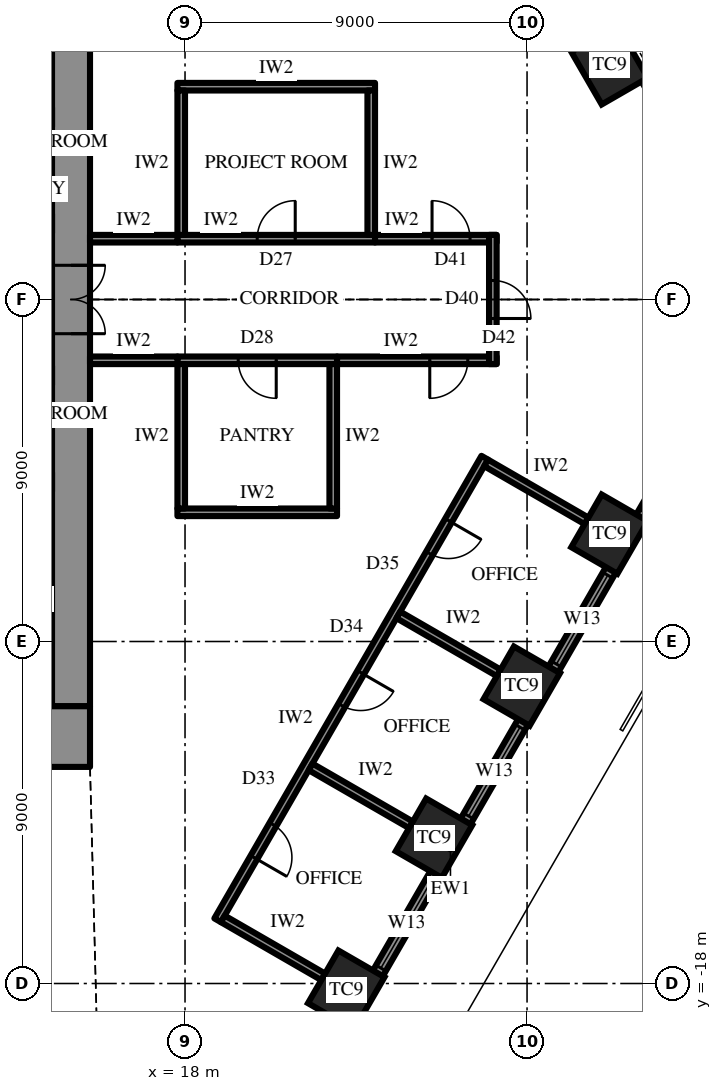
"""IFC4 building model, lengths in metres.
Left out: names, types, materials, properties, quantities, classifications, styles, units other than length and angle.
Written with IfcOpenShell. Run it as: python <this file> out.ifc"""

import sys

from ifc_helpers import new_model, si_unit, direction, frame, frame_2d, origin, origin_2d, place, context, subcontext, project, spatial, rectangle, extrude, element, fill, save


model = new_model("IFC4")
c1 = context("Model", 3, precision=1e-05, world=origin(), true_north=direction((0.0, 1.0)))
c2 = subcontext(c1, "Body", "Model", "MODEL_VIEW")
j1 = project(units=[si_unit("LENGTHUNIT", "METRE"), si_unit("PLANEANGLEUNIT", "RADIAN")], contexts=[c1])
p1 = place(None, origin())
s1 = spatial("IfcSite", under=j1, at=p1, CompositionType="ELEMENT")
p2 = place(p1, origin())
s2 = spatial("IfcBuilding", under=s1, at=p2, CompositionType="ELEMENT")
p3 = place(p2, frame((0.0, 0.0, 219.7)))
s3 = spatial("IfcBuildingStorey", under=s2, at=p3, CompositionType="ELEMENT", Elevation=219.7)
for number, where, z_axis, x_axis in (
    (1, (29.171, 6.175, 0.0), (0.0, 0.0, 1.0), (-0.5, 0.866, 0.0)),
    (2, (22.242, -18.175, 0.0), (0.0, 0.0, 1.0), (0.5, 0.866, 0.0)),
    (3, (24.552, -14.175, 0.0), (0.0, 0.0, 1.0), (0.5, 0.866, 0.0)),
    (4, (26.861, -10.175, 0.0), (0.0, 0.0, 1.0), (0.5, 0.866, 0.0)),
    (5, (29.171, -6.175, 0.0), (0.0, 0.0, 1.0), (0.5, 0.866, 0.0)),
):
    element("IfcColumn", number, at=place(p3, frame(where, z_axis=z_axis, x_axis=x_axis)), inside=s3, PredefinedType="COLUMN", context=c2, shape_type="SweptSolid", body=[
        extrude(rectangle(XDim=1.6, YDim=1.4, at=origin_2d()), origin(), (0.0, 0.0, 1.0), 4.2),
    ])
p4 = place(p3, frame((15.5, -11.5, 0.0), z_axis=(0.0, 0.0, 1.0), x_axis=(-1.0, 0.0, 0.0)))
e6 = element("IfcWall", 6, at=p4, inside=s3, PredefinedType="SHEAR", context=c2, shape_type="SweptSolid", body=[
    extrude(rectangle(XDim=31.0, YDim=1.6, at=frame_2d((15.5, 0.0))), origin(), (0.0, 0.0, 1.0), 4.2),
])
p5 = place(p4, frame((16.35, 0.0, 0.0)))
e7 = element("IfcOpeningElement", 7, at=p5, cuts=e6, PredefinedType="OPENING", context=c2, shape_type="SweptSolid", body=[
    extrude(rectangle(XDim=0.9, YDim=2.2, at=frame_2d((0.45, 1.1))), frame((0.0, 0.81, 0.0), z_axis=(0.0, -1.0, 0.0), x_axis=(1.0, 0.0, 0.0)), (0.0, 0.0, 1.0), 1.62),
])
p6 = place(p4, frame((19.35, 0.0, 0.0)))
e8 = element("IfcOpeningElement", 8, at=p6, cuts=e6, PredefinedType="OPENING", context=c2, shape_type="SweptSolid", body=[
    extrude(rectangle(XDim=0.9, YDim=2.2, at=frame_2d((0.45, 1.1))), frame((0.0, 0.81, 0.0), z_axis=(0.0, -1.0, 0.0), x_axis=(1.0, 0.0, 0.0)), (0.0, 0.0, 1.0), 1.62),
])
p7 = place(p4, frame((22.4, 0.0, 0.0)))
e9 = element("IfcOpeningElement", 9, at=p7, cuts=e6, PredefinedType="OPENING", context=c2, shape_type="SweptSolid", body=[
    extrude(rectangle(XDim=1.0, YDim=2.2, at=frame_2d((0.5, 1.1))), frame((0.0, 0.81, 0.0), z_axis=(0.0, -1.0, 0.0), x_axis=(1.0, 0.0, 0.0)), (0.0, 0.0, 1.0), 1.62),
])
p8 = place(p4, frame((1.65, 0.0, 0.0)))
e10 = element("IfcOpeningElement", 10, at=p8, cuts=e6, PredefinedType="OPENING", context=c2, shape_type="SweptSolid", body=[
    extrude(rectangle(XDim=0.9, YDim=2.2, at=frame_2d((0.45, 1.1))), frame((0.0, 0.81, 0.0), z_axis=(0.0, -1.0, 0.0), x_axis=(1.0, 0.0, 0.0)), (0.0, 0.0, 1.0), 1.62),
])
p9 = place(p4, frame((4.65, 0.0, 0.0)))
e11 = element("IfcOpeningElement", 11, at=p9, cuts=e6, PredefinedType="OPENING", context=c2, shape_type="SweptSolid", body=[
    extrude(rectangle(XDim=0.9, YDim=2.2, at=frame_2d((0.45, 1.1))), frame((0.0, 0.81, 0.0), z_axis=(0.0, -1.0, 0.0), x_axis=(1.0, 0.0, 0.0)), (0.0, 0.0, 1.0), 1.62),
])
p10 = place(p4, frame((25.45, 0.0, 0.0)))
e12 = element("IfcOpeningElement", 12, at=p10, cuts=e6, PredefinedType="OPENING", context=c2, shape_type="SweptSolid", body=[
    extrude(rectangle(XDim=0.9, YDim=2.2, at=frame_2d((0.45, 1.1))), frame((0.0, 0.81, 0.0), z_axis=(0.0, -1.0, 0.0), x_axis=(1.0, 0.0, 0.0)), (0.0, 0.0, 1.0), 1.62),
])
p11 = place(p4, frame((28.45, 0.0, 0.0)))
e13 = element("IfcOpeningElement", 13, at=p11, cuts=e6, PredefinedType="OPENING", context=c2, shape_type="SweptSolid", body=[
    extrude(rectangle(XDim=0.9, YDim=2.2, at=frame_2d((0.45, 1.1))), frame((0.0, 0.81, 0.0), z_axis=(0.0, -1.0, 0.0), x_axis=(1.0, 0.0, 0.0)), (0.0, 0.0, 1.0), 1.62),
])
p12 = place(p3, frame((15.0, -10.7, 0.0), z_axis=(0.0, 0.0, 1.0), x_axis=(0.0, 1.0, 0.0)))
e14 = element("IfcWall", 14, at=p12, inside=s3, PredefinedType="SHEAR", context=c2, shape_type="SweptSolid", body=[
    extrude(rectangle(XDim=21.4, YDim=1.0, at=frame_2d((10.7, 0.0))), origin(), (0.0, 0.0, 1.0), 4.2),
])
p13 = place(p12, frame((9.8, 0.0, 0.0)))
e15 = element("IfcOpeningElement", 15, at=p13, cuts=e14, PredefinedType="OPENING", context=c2, shape_type="SweptSolid", body=[
    extrude(rectangle(XDim=1.8, YDim=2.4, at=frame_2d((0.9, 1.2))), frame((0.0, 0.51, 0.0), z_axis=(0.0, -1.0, 0.0), x_axis=(1.0, 0.0, 0.0)), (0.0, 0.0, 1.0), 1.02),
])
p14 = place(p3, frame((12.3, 2.0, 0.0), z_axis=(0.0, 0.0, 1.0), x_axis=(1.0, 0.0, 0.0)))
e16 = element("IfcWall", 16, at=p14, inside=s3, PredefinedType="SHEAR", context=c2, shape_type="SweptSolid", body=[
    extrude(rectangle(XDim=2.2, YDim=0.5, at=frame_2d((1.1, 0.0))), origin(), (0.0, 0.0, 1.0), 4.2),
])
p15 = place(p14, frame((0.8, 0.0, 0.0)))
e17 = element("IfcOpeningElement", 17, at=p15, cuts=e16, PredefinedType="OPENING", context=c2, shape_type="SweptSolid", body=[
    extrude(rectangle(XDim=0.9, YDim=2.2, at=frame_2d((0.45, 1.1))), frame((0.0, 0.26, 0.0), z_axis=(0.0, -1.0, 0.0), x_axis=(1.0, 0.0, 0.0)), (0.0, 0.0, 1.0), 0.52),
])
p16 = place(p3, frame((12.3, 4.8, 0.0), z_axis=(0.0, 0.0, 1.0), x_axis=(1.0, 0.0, 0.0)))
e18 = element("IfcWall", 18, at=p16, inside=s3, PredefinedType="SHEAR", context=c2, shape_type="SweptSolid", body=[
    extrude(rectangle(XDim=2.2, YDim=0.5, at=frame_2d((1.1, 0.0))), origin(), (0.0, 0.0, 1.0), 4.2),
])
p17 = place(p3, frame((18.057, -26.425, 0.0), z_axis=(0.0, 0.0, 1.0), x_axis=(0.500001051461, 0.866024796723, 0.0)))
e19 = element("IfcWall", 19, at=p17, inside=s3, PredefinedType="SOLIDWALL", context=c2, shape_type="SweptSolid", body=[
    extrude(rectangle(XDim=27.713, YDim=0.3, at=frame_2d((13.856, 0.0))), origin(), (0.0, 0.0, 1.0), 2.0),
])
p18 = place(p17, frame((0.959, 0.0, 0.6)))
e20 = element("IfcOpeningElement", 20, at=p18, cuts=e19, PredefinedType="OPENING", context=c2, shape_type="SweptSolid", body=[
    extrude(rectangle(XDim=2.7, YDim=1.15, at=frame_2d((1.35, 0.575))), frame((0.0, 0.16, 0.0), z_axis=(0.0, -1.0, 0.0), x_axis=(1.0, 0.0, 0.0)), (0.0, 0.0, 1.0), 0.32),
])
p19 = place(p17, frame((5.578, 0.0, 0.6)))
e21 = element("IfcOpeningElement", 21, at=p19, cuts=e19, PredefinedType="OPENING", context=c2, shape_type="SweptSolid", body=[
    extrude(rectangle(XDim=2.7, YDim=1.15, at=frame_2d((1.35, 0.575))), frame((0.0, 0.16, 0.0), z_axis=(0.0, -1.0, 0.0), x_axis=(1.0, 0.0, 0.0)), (0.0, 0.0, 1.0), 0.32),
])
p20 = place(p17, frame((10.197, 0.0, 0.6)))
e22 = element("IfcOpeningElement", 22, at=p20, cuts=e19, PredefinedType="OPENING", context=c2, shape_type="SweptSolid", body=[
    extrude(rectangle(XDim=2.7, YDim=1.15, at=frame_2d((1.35, 0.575))), frame((0.0, 0.16, 0.0), z_axis=(0.0, -1.0, 0.0), x_axis=(1.0, 0.0, 0.0)), (0.0, 0.0, 1.0), 0.32),
])
p21 = place(p17, frame((14.816, 0.0, 0.6)))
e23 = element("IfcOpeningElement", 23, at=p21, cuts=e19, PredefinedType="OPENING", context=c2, shape_type="SweptSolid", body=[
    extrude(rectangle(XDim=2.7, YDim=1.15, at=frame_2d((1.35, 0.575))), frame((0.0, 0.16, 0.0), z_axis=(0.0, -1.0, 0.0), x_axis=(1.0, 0.0, 0.0)), (0.0, 0.0, 1.0), 0.32),
])
p22 = place(p17, frame((19.435, 0.0, 0.6)))
e24 = element("IfcOpeningElement", 24, at=p22, cuts=e19, PredefinedType="OPENING", context=c2, shape_type="SweptSolid", body=[
    extrude(rectangle(XDim=2.7, YDim=1.15, at=frame_2d((1.35, 0.575))), frame((0.0, 0.16, 0.0), z_axis=(0.0, -1.0, 0.0), x_axis=(1.0, 0.0, 0.0)), (0.0, 0.0, 1.0), 0.32),
])
p23 = place(p17, frame((24.053, 0.0, 0.6)))
e25 = element("IfcOpeningElement", 25, at=p23, cuts=e19, PredefinedType="OPENING", context=c2, shape_type="SweptSolid", body=[
    extrude(rectangle(XDim=2.7, YDim=1.15, at=frame_2d((1.35, 0.575))), frame((0.0, 0.16, 0.0), z_axis=(0.0, -1.0, 0.0), x_axis=(1.0, 0.0, 0.0)), (0.0, 0.0, 1.0), 0.32),
])
p24 = place(p3, frame((18.858, -16.337, 0.0), z_axis=(0.0, 0.0, 1.0), x_axis=(0.500002095642, 0.866024193862, 0.0)))
e26 = element("IfcWall", 26, at=p24, inside=s3, PredefinedType="PARTITIONING", context=c2, shape_type="SweptSolid", body=[
    extrude(rectangle(XDim=14.057, YDim=0.2, at=frame_2d((7.028, 0.0))), origin(), (0.0, 0.0, 1.0), 4.0),
])
p25 = place(p24, frame((1.909, 0.0, 0.0)))
e27 = element("IfcOpeningElement", 27, at=p25, cuts=e26, PredefinedType="OPENING", context=c2, shape_type="SweptSolid", body=[
    extrude(rectangle(XDim=1.0, YDim=2.2, at=frame_2d((0.5, 1.1))), frame((0.0, 0.11, 0.0), z_axis=(0.0, -1.0, 0.0), x_axis=(1.0, 0.0, 0.0)), (0.0, 0.0, 1.0), 0.22),
])
p26 = place(p24, frame((6.528, 0.0, 0.0)))
e28 = element("IfcOpeningElement", 28, at=p26, cuts=e26, PredefinedType="OPENING", context=c2, shape_type="SweptSolid", body=[
    extrude(rectangle(XDim=1.0, YDim=2.2, at=frame_2d((0.5, 1.1))), frame((0.0, 0.11, 0.0), z_axis=(0.0, -1.0, 0.0), x_axis=(1.0, 0.0, 0.0)), (0.0, 0.0, 1.0), 0.22),
])
p27 = place(p24, frame((11.147, 0.0, 0.0)))
e29 = element("IfcOpeningElement", 29, at=p27, cuts=e26, PredefinedType="OPENING", context=c2, shape_type="SweptSolid", body=[
    extrude(rectangle(XDim=1.0, YDim=2.2, at=frame_2d((0.5, 1.1))), frame((0.0, 0.11, 0.0), z_axis=(0.0, -1.0, 0.0), x_axis=(1.0, 0.0, 0.0)), (0.0, 0.0, 1.0), 0.22),
])
for number, where, z_axis, x_axis in (
    (30, (18.995, -16.3, 0.0), (0.0, 0.0, 1.0), (0.866, -0.5, 0.0)),
    (31, (21.304, -12.3, 0.0), (0.0, 0.0, 1.0), (0.866, -0.5, 0.0)),
    (32, (23.614, -8.3, 0.0), (0.0, 0.0, 1.0), (0.866, -0.5, 0.0)),
    (33, (25.923, -4.3, 0.0), (0.0, 0.0, 1.0), (0.866, -0.5, 0.0)),
):
    element("IfcWall", number, at=place(p3, frame(where, z_axis=z_axis, x_axis=x_axis)), inside=s3, PredefinedType="PARTITIONING", context=c2, shape_type="SweptSolid", body=[
        extrude(rectangle(XDim=3.05, YDim=0.2, at=frame_2d((1.525, 0.0))), origin(), (0.0, 0.0, 1.0), 3.082),
    ])
p28 = place(p3, frame((17.8, 1.6, 0.0), z_axis=(0.0, 0.0, 1.0), x_axis=(1.0, 0.0, 0.0)))
e34 = element("IfcWall", 34, at=p28, inside=s3, PredefinedType="PARTITIONING", context=c2, shape_type="SweptSolid", body=[
    extrude(rectangle(XDim=5.2, YDim=0.2, at=frame_2d((2.6, 0.0))), origin(), (0.0, 0.0, 1.0), 4.0),
])
p29 = place(p28, frame((2.1, 0.0, 0.0)))
e35 = element("IfcOpeningElement", 35, at=p29, cuts=e34, PredefinedType="OPENING", context=c2, shape_type="SweptSolid", body=[
    extrude(rectangle(XDim=1.0, YDim=2.2, at=frame_2d((0.5, 1.1))), frame((0.0, 0.11, 0.0), z_axis=(0.0, -1.0, 0.0), x_axis=(1.0, 0.0, 0.0)), (0.0, 0.0, 1.0), 0.22),
])
p30 = place(p3, frame((17.8, 5.6, 0.0), z_axis=(0.0, 0.0, 1.0), x_axis=(1.0, 0.0, 0.0)))
e36 = element("IfcWall", 36, at=p30, inside=s3, PredefinedType="PARTITIONING", context=c2, shape_type="SweptSolid", body=[
    extrude(rectangle(XDim=5.2, YDim=0.2, at=frame_2d((2.6, 0.0))), origin(), (0.0, 0.0, 1.0), 4.0),
])
for number, where, z_axis, x_axis in (
    (37, (17.9, 1.7, 0.0), (0.0, 0.0, 1.0), (0.0, 1.0, 0.0)),
    (38, (22.9, 1.7, 0.0), (0.0, 0.0, 1.0), (0.0, 1.0, 0.0)),
):
    element("IfcWall", number, at=place(p3, frame(where, z_axis=z_axis, x_axis=x_axis)), inside=s3, PredefinedType="PARTITIONING", context=c2, shape_type="SweptSolid", body=[
        extrude(rectangle(XDim=3.8, YDim=0.2, at=frame_2d((1.9, 0.0))), origin(), (0.0, 0.0, 1.0), 4.0),
    ])
p31 = place(p3, frame((17.8, -1.6, 0.0), z_axis=(0.0, 0.0, 1.0), x_axis=(1.0, 0.0, 0.0)))
e39 = element("IfcWall", 39, at=p31, inside=s3, PredefinedType="PARTITIONING", context=c2, shape_type="SweptSolid", body=[
    extrude(rectangle(XDim=4.2, YDim=0.2, at=frame_2d((2.1, 0.0))), origin(), (0.0, 0.0, 1.0), 4.0),
])
p32 = place(p31, frame((1.6, 0.0, 0.0)))
e40 = element("IfcOpeningElement", 40, at=p32, cuts=e39, PredefinedType="OPENING", context=c2, shape_type="SweptSolid", body=[
    extrude(rectangle(XDim=1.0, YDim=2.2, at=frame_2d((0.5, 1.1))), frame((0.0, 0.11, 0.0), z_axis=(0.0, -1.0, 0.0), x_axis=(1.0, 0.0, 0.0)), (0.0, 0.0, 1.0), 0.22),
])
p33 = place(p3, frame((17.8, -5.6, 0.0), z_axis=(0.0, 0.0, 1.0), x_axis=(1.0, 0.0, 0.0)))
e41 = element("IfcWall", 41, at=p33, inside=s3, PredefinedType="PARTITIONING", context=c2, shape_type="SweptSolid", body=[
    extrude(rectangle(XDim=4.2, YDim=0.2, at=frame_2d((2.1, 0.0))), origin(), (0.0, 0.0, 1.0), 4.0),
])
for number, where, z_axis, x_axis in (
    (42, (17.9, -1.7, 0.0), (0.0, 0.0, 1.0), (0.0, -1.0, 0.0)),
    (43, (21.9, -1.7, 0.0), (0.0, 0.0, 1.0), (0.0, -1.0, 0.0)),
):
    element("IfcWall", number, at=place(p3, frame(where, z_axis=z_axis, x_axis=x_axis)), inside=s3, PredefinedType="PARTITIONING", context=c2, shape_type="SweptSolid", body=[
        extrude(rectangle(XDim=3.8, YDim=0.2, at=frame_2d((1.9, 0.0))), origin(), (0.0, 0.0, 1.0), 4.0),
    ])
p34 = place(p3, frame((15.5, 1.6, 0.0), z_axis=(0.0, 0.0, 1.0), x_axis=(1.0, 0.0, 0.0)))
e44 = element("IfcWall", 44, at=p34, inside=s3, PredefinedType="PARTITIONING", context=c2, shape_type="SweptSolid", body=[
    extrude(rectangle(XDim=2.3, YDim=0.2, at=frame_2d((1.15, 0.0))), origin(), (0.0, 0.0, 1.0), 4.0),
])
p35 = place(p3, frame((23.0, 1.6, 0.0), z_axis=(0.0, 0.0, 1.0), x_axis=(1.0, 0.0, 0.0)))
e45 = element("IfcWall", 45, at=p35, inside=s3, PredefinedType="PARTITIONING", context=c2, shape_type="SweptSolid", body=[
    extrude(rectangle(XDim=3.2, YDim=0.2, at=frame_2d((1.6, 0.0))), origin(), (0.0, 0.0, 1.0), 4.0),
])
p36 = place(p35, frame((1.5, 0.0, 0.0)))
e46 = element("IfcOpeningElement", 46, at=p36, cuts=e45, PredefinedType="OPENING", context=c2, shape_type="SweptSolid", body=[
    extrude(rectangle(XDim=1.0, YDim=2.2, at=frame_2d((0.5, 1.1))), frame((0.0, 0.11, 0.0), z_axis=(0.0, -1.0, 0.0), x_axis=(1.0, 0.0, 0.0)), (0.0, 0.0, 1.0), 0.22),
])
p37 = place(p3, frame((15.5, -1.6, 0.0), z_axis=(0.0, 0.0, 1.0), x_axis=(1.0, 0.0, 0.0)))
e47 = element("IfcWall", 47, at=p37, inside=s3, PredefinedType="PARTITIONING", context=c2, shape_type="SweptSolid", body=[
    extrude(rectangle(XDim=2.3, YDim=0.2, at=frame_2d((1.15, 0.0))), origin(), (0.0, 0.0, 1.0), 4.0),
])
p38 = place(p3, frame((22.0, -1.6, 0.0), z_axis=(0.0, 0.0, 1.0), x_axis=(1.0, 0.0, 0.0)))
e48 = element("IfcWall", 48, at=p38, inside=s3, PredefinedType="PARTITIONING", context=c2, shape_type="SweptSolid", body=[
    extrude(rectangle(XDim=4.2, YDim=0.2, at=frame_2d((2.1, 0.0))), origin(), (0.0, 0.0, 1.0), 4.0),
])
p39 = place(p38, frame((2.44, 0.0, 0.0)))
e49 = element("IfcOpeningElement", 49, at=p39, cuts=e48, PredefinedType="OPENING", context=c2, shape_type="SweptSolid", body=[
    extrude(rectangle(XDim=1.0, YDim=2.2, at=frame_2d((0.5, 1.1))), frame((0.0, 0.11, 0.0), z_axis=(0.0, -1.0, 0.0), x_axis=(1.0, 0.0, 0.0)), (0.0, 0.0, 1.0), 0.22),
])
p40 = place(p3, frame((26.1, -1.7, 0.0), z_axis=(0.0, 0.0, 1.0), x_axis=(0.0, 1.0, 0.0)))
e50 = element("IfcWall", 50, at=p40, inside=s3, PredefinedType="PARTITIONING", context=c2, shape_type="SweptSolid", body=[
    extrude(rectangle(XDim=3.4, YDim=0.2, at=frame_2d((1.7, 0.0))), origin(), (0.0, 0.0, 1.0), 4.0),
])
p41 = place(p40, frame((1.2, 0.0, 0.0)))
e51 = element("IfcOpeningElement", 51, at=p41, cuts=e50, PredefinedType="OPENING", context=c2, shape_type="SweptSolid", body=[
    extrude(rectangle(XDim=1.0, YDim=2.2, at=frame_2d((0.5, 1.1))), frame((0.0, 0.11, 0.0), z_axis=(0.0, -1.0, 0.0), x_axis=(1.0, 0.0, 0.0)), (0.0, 0.0, 1.0), 0.22),
])
p42 = place(p20, origin())
e52 = element("IfcWindow", 52, at=p42, inside=s3, PartitioningType="SINGLE_PANEL", PredefinedType="WINDOW", context=c2, shape_type="SweptSolid", body=[
    extrude(rectangle(XDim=2.7, YDim=1.15, at=frame_2d((1.35, 0.575))), frame((0.0, 0.03, 0.0), z_axis=(0.0, -1.0, 0.0), x_axis=(1.0, 0.0, 0.0)), (0.0, 0.0, 1.0), 0.06),
])
fill(e22, e52)
p43 = place(p21, origin())
e53 = element("IfcWindow", 53, at=p43, inside=s3, PartitioningType="SINGLE_PANEL", PredefinedType="WINDOW", context=c2, shape_type="SweptSolid", body=[
    extrude(rectangle(XDim=2.7, YDim=1.15, at=frame_2d((1.35, 0.575))), frame((0.0, 0.03, 0.0), z_axis=(0.0, -1.0, 0.0), x_axis=(1.0, 0.0, 0.0)), (0.0, 0.0, 1.0), 0.06),
])
fill(e23, e53)
p44 = place(p22, origin())
e54 = element("IfcWindow", 54, at=p44, inside=s3, PartitioningType="SINGLE_PANEL", PredefinedType="WINDOW", context=c2, shape_type="SweptSolid", body=[
    extrude(rectangle(XDim=2.7, YDim=1.15, at=frame_2d((1.35, 0.575))), frame((0.0, 0.03, 0.0), z_axis=(0.0, -1.0, 0.0), x_axis=(1.0, 0.0, 0.0)), (0.0, 0.0, 1.0), 0.06),
])
fill(e24, e54)
p45 = place(p13, frame((1.8, 0.0, 0.0), z_axis=(0.0, 0.0, 1.0), x_axis=(-1.0, 0.0, 0.0)))
e55 = element("IfcDoor", 55, at=p45, inside=s3, OperationType="DOUBLE_DOOR_SINGLE_SWING", PredefinedType="DOOR", context=c2, shape_type="SweptSolid", body=[
    extrude(rectangle(XDim=1.8, YDim=2.4, at=frame_2d((0.9, 1.2))), frame((0.0, 0.025, 0.0), z_axis=(0.0, -1.0, 0.0), x_axis=(1.0, 0.0, 0.0)), (0.0, 0.0, 1.0), 0.05),
])
fill(e15, e55)
p46 = place(p25, frame((1.0, 0.0, 0.0), z_axis=(0.0, 0.0, 1.0), x_axis=(-1.0, 0.0, 0.0)))
e56 = element("IfcDoor", 56, at=p46, inside=s3, OperationType="SINGLE_SWING_LEFT", PredefinedType="DOOR", context=c2, shape_type="SweptSolid", body=[
    extrude(rectangle(XDim=1.0, YDim=2.2, at=frame_2d((0.5, 1.1))), frame((0.0, 0.025, 0.0), z_axis=(0.0, -1.0, 0.0), x_axis=(1.0, 0.0, 0.0)), (0.0, 0.0, 1.0), 0.05),
])
fill(e27, e56)
p47 = place(p26, frame((1.0, 0.0, 0.0), z_axis=(0.0, 0.0, 1.0), x_axis=(-1.0, 0.0, 0.0)))
e57 = element("IfcDoor", 57, at=p47, inside=s3, OperationType="SINGLE_SWING_RIGHT", PredefinedType="DOOR", context=c2, shape_type="SweptSolid", body=[
    extrude(rectangle(XDim=1.0, YDim=2.2, at=frame_2d((0.5, 1.1))), frame((0.0, 0.025, 0.0), z_axis=(0.0, -1.0, 0.0), x_axis=(1.0, 0.0, 0.0)), (0.0, 0.0, 1.0), 0.05),
])
fill(e28, e57)
p48 = place(p27, frame((1.0, 0.0, 0.0), z_axis=(0.0, 0.0, 1.0), x_axis=(-1.0, 0.0, 0.0)))
e58 = element("IfcDoor", 58, at=p48, inside=s3, OperationType="SINGLE_SWING_RIGHT", PredefinedType="DOOR", context=c2, shape_type="SweptSolid", body=[
    extrude(rectangle(XDim=1.0, YDim=2.2, at=frame_2d((0.5, 1.1))), frame((0.0, 0.025, 0.0), z_axis=(0.0, -1.0, 0.0), x_axis=(1.0, 0.0, 0.0)), (0.0, 0.0, 1.0), 0.05),
])
fill(e29, e58)
p49 = place(p29, origin())
e59 = element("IfcDoor", 59, at=p49, inside=s3, OperationType="SINGLE_SWING_LEFT", PredefinedType="DOOR", context=c2, shape_type="SweptSolid", body=[
    extrude(rectangle(XDim=1.0, YDim=2.2, at=frame_2d((0.5, 1.1))), frame((0.0, 0.025, 0.0), z_axis=(0.0, -1.0, 0.0), x_axis=(1.0, 0.0, 0.0)), (0.0, 0.0, 1.0), 0.05),
])
fill(e35, e59)
p50 = place(p32, frame((1.0, 0.0, 0.0), z_axis=(0.0, 0.0, 1.0), x_axis=(-1.0, 0.0, 0.0)))
e60 = element("IfcDoor", 60, at=p50, inside=s3, OperationType="SINGLE_SWING_RIGHT", PredefinedType="DOOR", context=c2, shape_type="SweptSolid", body=[
    extrude(rectangle(XDim=1.0, YDim=2.2, at=frame_2d((0.5, 1.1))), frame((0.0, 0.025, 0.0), z_axis=(0.0, -1.0, 0.0), x_axis=(1.0, 0.0, 0.0)), (0.0, 0.0, 1.0), 0.05),
])
fill(e40, e60)
p51 = place(p36, origin())
e61 = element("IfcDoor", 61, at=p51, inside=s3, OperationType="SINGLE_SWING_RIGHT", PredefinedType="DOOR", context=c2, shape_type="SweptSolid", body=[
    extrude(rectangle(XDim=1.0, YDim=2.2, at=frame_2d((0.5, 1.1))), frame((0.0, 0.025, 0.0), z_axis=(0.0, -1.0, 0.0), x_axis=(1.0, 0.0, 0.0)), (0.0, 0.0, 1.0), 0.05),
])
fill(e46, e61)
p52 = place(p39, frame((1.0, 0.0, 0.0), z_axis=(0.0, 0.0, 1.0), x_axis=(-1.0, 0.0, 0.0)))
e62 = element("IfcDoor", 62, at=p52, inside=s3, OperationType="SINGLE_SWING_LEFT", PredefinedType="DOOR", context=c2, shape_type="SweptSolid", body=[
    extrude(rectangle(XDim=1.0, YDim=2.2, at=frame_2d((0.5, 1.1))), frame((0.0, 0.025, 0.0), z_axis=(0.0, -1.0, 0.0), x_axis=(1.0, 0.0, 0.0)), (0.0, 0.0, 1.0), 0.05),
])
fill(e49, e62)
p53 = place(p41, frame((1.0, 0.0, 0.0), z_axis=(0.0, 0.0, 1.0), x_axis=(-1.0, 0.0, 0.0)))
e63 = element("IfcDoor", 63, at=p53, inside=s3, OperationType="SINGLE_SWING_LEFT", PredefinedType="DOOR", context=c2, shape_type="SweptSolid", body=[
    extrude(rectangle(XDim=1.0, YDim=2.2, at=frame_2d((0.5, 1.1))), frame((0.0, 0.025, 0.0), z_axis=(0.0, -1.0, 0.0), x_axis=(1.0, 0.0, 0.0)), (0.0, 0.0, 1.0), 0.05),
])
fill(e51, e63)
save(model, sys.argv[1])
